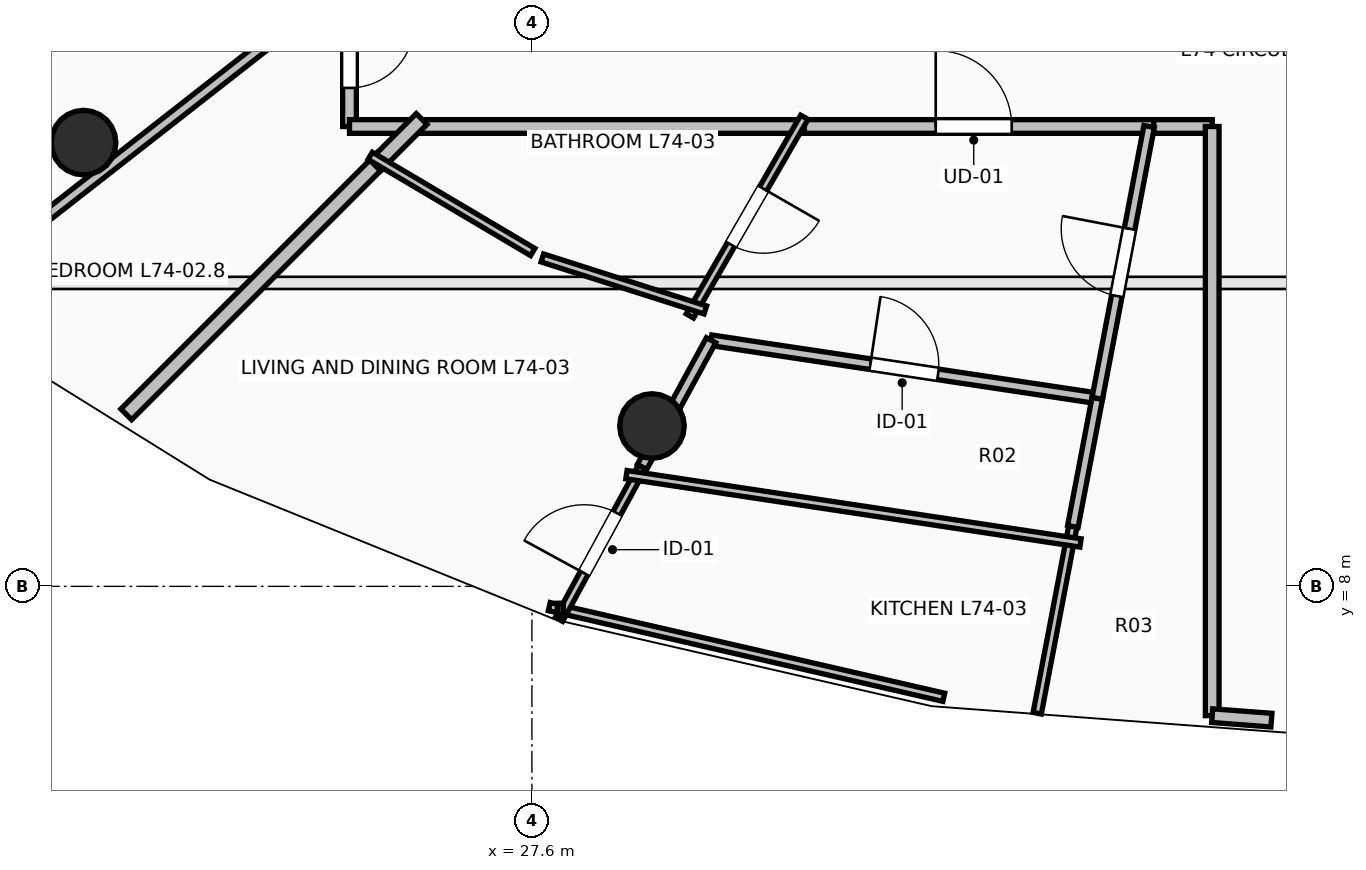
"""IFC4 building model, lengths in metres.
Left out: names, types, materials, properties, quantities, classifications, styles, units other than length and angle.
Written with IfcOpenShell. Run it as: python <this file> out.ifc"""

import sys

from ifc_helpers import new_model, si_unit, direction, frame, frame_2d, origin, origin_2d, place, context, subcontext, project, spatial, rectangle, circle, extrude, element, fill, save


model = new_model("IFC4")
c1 = context("Model", 3, precision=1e-05, world=origin(), true_north=direction((0.0, 1.0)))
c2 = subcontext(c1, "Body", "Model", "MODEL_VIEW")
j1 = project(units=[si_unit("LENGTHUNIT", "METRE"), si_unit("PLANEANGLEUNIT", "RADIAN")], contexts=[c1])
p1 = place(None, origin())
s1 = spatial("IfcSite", under=j1, at=p1, CompositionType="ELEMENT")
p2 = place(p1, origin())
s2 = spatial("IfcBuilding", under=s1, at=p2, CompositionType="ELEMENT")
p3 = place(p2, frame((0.0, 0.0, 273.3)))
s3 = spatial("IfcBuildingStorey", under=s2, at=p3, CompositionType="ELEMENT", Elevation=273.3)
for number, where, z_axis, x_axis in (
    (1, (21.701, 13.838, 0.0), (0.0, 0.0, 1.0), (-0.707, -0.707, 0.0)),
    (2, (29.179, 10.109, 0.0), (0.0, 0.0, 1.0), (-0.383, -0.924, 0.0)),
):
    element("IfcColumn", number, at=place(p3, frame(where, z_axis=z_axis, x_axis=x_axis)), inside=s3, PredefinedType="COLUMN", context=c2, shape_type="SweptSolid", body=[
        extrude(circle(Radius=0.425, at=origin_2d()), origin(), (0.0, 0.0, 1.0), 3.55),
    ])
p4 = place(p3, frame((25.2, 15.915, 0.0), z_axis=(0.0, 0.0, 1.0), x_axis=(0.0, -1.0, 0.0)))
e3 = element("IfcWall", 3, at=p4, inside=s3, PredefinedType="PARTITIONING", context=c2, shape_type="SweptSolid", body=[
    extrude(rectangle(XDim=1.865, YDim=0.18, at=frame_2d((0.933, 0.0))), origin(), (0.0, 0.0, 1.0), 2.482),
])
p5 = place(p4, frame((0.508, 0.0, 0.0)))
e4 = element("IfcOpeningElement", 4, at=p5, cuts=e3, PredefinedType="OPENING", context=c2, shape_type="SweptSolid", body=[
    extrude(rectangle(XDim=0.85, YDim=2.1, at=frame_2d((0.425, 1.05))), frame((0.0, 0.105, 0.0), z_axis=(0.0, -1.0, 0.0), x_axis=(1.0, 0.0, 0.0)), (0.0, 0.0, 1.0), 0.21),
])
p6 = place(p3, frame((25.2, 14.05, 0.0), z_axis=(0.0, 0.0, 1.0), x_axis=(1.0, 0.0, 0.0)))
e5 = element("IfcWall", 5, at=p6, inside=s3, PredefinedType="PARTITIONING", context=c2, shape_type="SweptSolid", body=[
    extrude(rectangle(XDim=0.91, YDim=0.18, at=frame_2d((0.455, 0.0))), origin(), (0.0, 0.0, 1.0), 2.979),
])
p7 = place(p3, frame((31.045, 14.05, 0.0), z_axis=(0.0, 0.0, 1.0), x_axis=(1.0, 0.0, 0.0)))
e6 = element("IfcWall", 6, at=p7, inside=s3, PredefinedType="PARTITIONING", context=c2, shape_type="SweptSolid", body=[
    extrude(rectangle(XDim=4.735, YDim=0.18, at=frame_2d((2.368, 0.0))), origin(), (0.0, 0.0, 1.0), 3.29),
])
p8 = place(p7, frame((1.867, 0.0, 0.0)))
e7 = element("IfcOpeningElement", 7, at=p8, cuts=e6, PredefinedType="OPENING", context=c2, shape_type="SweptSolid", body=[
    extrude(rectangle(XDim=1.0, YDim=2.15, at=frame_2d((0.5, 1.075))), frame((0.0, 0.105, 0.0), z_axis=(0.0, -1.0, 0.0), x_axis=(1.0, 0.0, 0.0)), (0.0, 0.0, 1.0), 0.21),
])
p9 = place(p3, frame((25.97, 14.05, 0.0), z_axis=(0.0, 0.0, 1.0), x_axis=(1.0, 0.0, 0.0)))
e8 = element("IfcWall", 8, at=p9, inside=s3, PredefinedType="PARTITIONING", context=c2, shape_type="SweptSolid", body=[
    extrude(rectangle(XDim=5.215, YDim=0.18, at=frame_2d((2.607, 0.0))), origin(), (0.0, 0.0, 1.0), 2.482),
])
p10 = place(p3, frame((35.78, 14.05, 0.0), z_axis=(0.0, 0.0, 1.0), x_axis=(1.0, 0.0, 0.0)))
e9 = element("IfcWall", 9, at=p10, inside=s3, PredefinedType="PARTITIONING", context=c2, shape_type="SweptSolid", body=[
    extrude(rectangle(XDim=0.77, YDim=0.18, at=frame_2d((0.385, 0.0))), origin(), (0.0, 0.0, 1.0), 2.924),
])
p11 = place(p3, frame((36.55, 14.05, 0.0), z_axis=(0.0, 0.0, 1.0), x_axis=(0.0, -1.0, 0.0)))
e10 = element("IfcWall", 10, at=p11, inside=s3, PredefinedType="PARTITIONING", context=c2, shape_type="SweptSolid", body=[
    extrude(rectangle(XDim=7.751, YDim=0.18, at=frame_2d((3.875, 0.0))), origin(), (0.0, 0.0, 1.0), 2.874),
])
p12 = place(p3, frame((36.55, 6.299, 0.0), z_axis=(0.0, 0.0, 1.0), x_axis=(0.997136622012, -0.0756211415, 0.0)))
e11 = element("IfcWall", 11, at=p12, inside=s3, PredefinedType="PARTITIONING", context=c2, shape_type="SweptSolid", body=[
    extrude(rectangle(XDim=0.781, YDim=0.18, at=frame_2d((0.391, 0.0))), origin(), (0.0, 0.0, 1.0), 3.29),
])
p13 = place(p3, frame((17.602, 13.72, 0.0), z_axis=(0.0, 0.0, 1.0), x_axis=(0.856734134601, 0.515758298633, 0.0)))
e12 = element("IfcWall", 12, at=p13, inside=s3, PredefinedType="PARTITIONING", context=c2, shape_type="SweptSolid", body=[
    extrude(rectangle(XDim=8.868, YDim=0.14, at=frame_2d((4.434, 0.0))), origin(), (0.0, 0.0, 1.0), 2.482),
])
p14 = place(p3, frame((19.819, 11.782, 0.0), z_axis=(0.0, 0.0, 1.0), x_axis=(0.78765580417, 0.61611552014, 0.0)))
e13 = element("IfcWall", 13, at=p14, inside=s3, PredefinedType="PARTITIONING", context=c2, shape_type="SweptSolid", body=[
    extrude(rectangle(XDim=6.832, YDim=0.14, at=frame_2d((3.416, 0.0))), origin(), (0.0, 0.0, 1.0), 2.482),
])
p15 = place(p3, frame((22.263, 10.263, 0.0), z_axis=(0.0, 0.0, 1.0), x_axis=(0.707106781187, 0.707106781187, 0.0)))
e14 = element("IfcWall", 14, at=p15, inside=s3, PredefinedType="PARTITIONING", context=c2, shape_type="SweptSolid", body=[
    extrude(rectangle(XDim=4.771, YDim=0.2, at=frame_2d((2.386, 0.0))), origin(), (0.0, 0.0, 1.0), 2.874),
])
p16 = place(p3, frame((25.538, 13.538, 0.0), z_axis=(0.0, 0.0, 1.0), x_axis=(0.707106781187, 0.707106781187, 0.0)))
e15 = element("IfcWall", 15, at=p16, inside=s3, PredefinedType="PARTITIONING", context=c2, shape_type="SweptSolid", body=[
    extrude(rectangle(XDim=0.864, YDim=0.2, at=frame_2d((0.432, 0.0))), origin(), (0.0, 0.0, 1.0), 2.979),
])
p17 = place(p3, frame((31.184, 14.171, 0.0), z_axis=(0.0, 0.0, 1.0), x_axis=(-0.499203880251, -0.86648455609, 0.0)))
e16 = element("IfcWall", 16, at=p17, inside=s3, PredefinedType="PARTITIONING", context=c2, shape_type="SweptSolid", body=[
    extrude(rectangle(XDim=3.017, YDim=0.11, at=frame_2d((1.508, 0.0))), origin(), (0.0, 0.0, 1.0), 2.924),
])
p18 = place(p17, frame((1.083, 0.0, 0.0)))
e17 = element("IfcOpeningElement", 17, at=p18, cuts=e16, PredefinedType="OPENING", context=c2, shape_type="SweptSolid", body=[
    extrude(rectangle(XDim=0.85, YDim=2.1, at=frame_2d((0.425, 1.05))), frame((0.0, 0.07, 0.0), z_axis=(0.0, -1.0, 0.0), x_axis=(1.0, 0.0, 0.0)), (0.0, 0.0, 1.0), 0.14),
])
p19 = place(p3, frame((29.881, 11.636, 0.0), z_axis=(0.0, 0.0, 1.0), x_axis=(-0.952713330874, 0.30387054674, 0.0)))
e18 = element("IfcWall", 18, at=p19, inside=s3, PredefinedType="PARTITIONING", context=c2, shape_type="SweptSolid", body=[
    extrude(rectangle(XDim=2.251, YDim=0.11, at=frame_2d((1.125, 0.0))), origin(), (0.0, 0.0, 1.0), 2.482),
])
p20 = place(p3, frame((27.611, 12.399, 0.0), z_axis=(0.0, 0.0, 1.0), x_axis=(-0.860546797705, 0.509371386082, 0.0)))
e19 = element("IfcWall", 19, at=p20, inside=s3, PredefinedType="PARTITIONING", context=c2, shape_type="SweptSolid", body=[
    extrude(rectangle(XDim=2.485, YDim=0.11, at=frame_2d((1.242, 0.0))), origin(), (0.0, 0.0, 1.0), 3.29),
])
p21 = place(p3, frame((34.716, 8.789, 0.0), z_axis=(0.0, 0.0, 1.0), x_axis=(-0.187233159216, -0.982315501298, 0.0)))
e20 = element("IfcWall", 20, at=p21, inside=s3, PredefinedType="PARTITIONING", context=c2, shape_type="SweptSolid", body=[
    extrude(rectangle(XDim=2.502, YDim=0.11, at=frame_2d((1.251, 0.0))), origin(), (0.0, 0.0, 1.0), 3.29),
])
p22 = place(p3, frame((27.829, 7.733, 0.0), z_axis=(0.0, 0.0, 1.0), x_axis=(0.974586324437, -0.224012268015, 0.0)))
e21 = element("IfcWall", 21, at=p22, inside=s3, PredefinedType="PARTITIONING", context=c2, shape_type="SweptSolid", body=[
    extrude(rectangle(XDim=5.325, YDim=0.11, at=frame_2d((2.663, 0.0))), origin(), (0.0, 0.0, 1.0), 3.29),
])
p23 = place(p3, frame((27.956, 7.566, 0.0), z_axis=(0.0, 0.0, 1.0), x_axis=(0.478485169604, 0.878095634011, 0.0)))
e22 = element("IfcWall", 22, at=p23, inside=s3, PredefinedType="PARTITIONING", context=c2, shape_type="SweptSolid", body=[
    extrude(rectangle(XDim=2.284, YDim=0.11, at=frame_2d((1.142, 0.0))), origin(), (0.0, 0.0, 1.0), 3.29),
])
p24 = place(p23, frame((0.692, 0.0, 0.0)))
e23 = element("IfcOpeningElement", 23, at=p24, cuts=e22, PredefinedType="OPENING", context=c2, shape_type="SweptSolid", body=[
    extrude(rectangle(XDim=0.9, YDim=2.1, at=frame_2d((0.45, 1.05))), frame((0.0, 0.07, 0.0), z_axis=(0.0, -1.0, 0.0), x_axis=(1.0, 0.0, 0.0)), (0.0, 0.0, 1.0), 0.14),
])
p25 = place(p3, frame((29.957, 11.238, 0.0), z_axis=(0.0, 0.0, 1.0), x_axis=(0.988886109078, -0.148675025721, 0.0)))
e24 = element("IfcWall", 24, at=p25, inside=s3, PredefinedType="PARTITIONING", context=c2, shape_type="SweptSolid", body=[
    extrude(rectangle(XDim=5.138, YDim=0.14, at=frame_2d((2.569, 0.0))), origin(), (0.0, 0.0, 1.0), 3.29),
])
p26 = place(p25, frame((2.119, 0.0, 0.0)))
e25 = element("IfcOpeningElement", 25, at=p26, cuts=e24, PredefinedType="OPENING", context=c2, shape_type="SweptSolid", body=[
    extrude(rectangle(XDim=0.9, YDim=2.1, at=frame_2d((0.45, 1.05))), frame((0.0, 0.085, 0.0), z_axis=(0.0, -1.0, 0.0), x_axis=(1.0, 0.0, 0.0)), (0.0, 0.0, 1.0), 0.17),
])
p27 = place(p3, frame((35.038, 10.474, 0.0), z_axis=(0.0, 0.0, 1.0), x_axis=(-0.187353972187, -0.982292466176, 0.0)))
e26 = element("IfcWall", 26, at=p27, inside=s3, PredefinedType="PARTITIONING", context=c2, shape_type="SweptSolid", body=[
    extrude(rectangle(XDim=1.716, YDim=0.14, at=frame_2d((0.858, 0.0))), origin(), (0.0, 0.0, 1.0), 2.874),
])
p28 = place(p3, frame((29.049, 9.572, 0.0), z_axis=(0.0, 0.0, 1.0), x_axis=(0.478536562944, 0.878067627194, 0.0)))
e27 = element("IfcWall", 27, at=p28, inside=s3, PredefinedType="PARTITIONING", context=c2, shape_type="SweptSolid", body=[
    extrude(rectangle(XDim=1.897, YDim=0.14, at=frame_2d((0.949, 0.0))), origin(), (0.0, 0.0, 1.0), 3.29),
])
p29 = place(p3, frame((35.038, 10.474, 0.0), z_axis=(0.0, 0.0, 1.0), x_axis=(0.187312418361, 0.982300390882, 0.0)))
e28 = element("IfcWall", 28, at=p29, inside=s3, PredefinedType="PARTITIONING", context=c2, shape_type="SweptSolid", body=[
    extrude(rectangle(XDim=3.64, YDim=0.14, at=frame_2d((1.82, 0.0))), origin(), (0.0, 0.0, 1.0), 2.979),
])
p30 = place(p29, frame((1.37, 0.0, 0.0)))
e29 = element("IfcOpeningElement", 29, at=p30, cuts=e28, PredefinedType="OPENING", context=c2, shape_type="SweptSolid", body=[
    extrude(rectangle(XDim=0.9, YDim=2.1, at=frame_2d((0.45, 1.05))), frame((0.0, 0.085, 0.0), z_axis=(0.0, -1.0, 0.0), x_axis=(1.0, 0.0, 0.0)), (0.0, 0.0, 1.0), 0.17),
])
p31 = place(p3, frame((34.817, 8.571, 0.0), z_axis=(0.0, 0.0, 1.0), x_axis=(-0.988879067965, 0.148721850918, 0.0)))
e30 = element("IfcWall", 30, at=p31, inside=s3, PredefinedType="PARTITIONING", context=c2, shape_type="SweptSolid", body=[
    extrude(rectangle(XDim=6.041, YDim=0.11, at=frame_2d((3.021, 0.0))), origin(), (0.0, 0.0, 1.0), 3.29),
])
p32 = place(p8, origin())
e31 = element("IfcDoor", 31, at=p32, inside=s3, OperationType="SINGLE_SWING_LEFT", PredefinedType="DOOR", context=c2, shape_type="SweptSolid", body=[
    extrude(rectangle(XDim=1.0, YDim=2.15, at=frame_2d((0.5, 1.075))), frame((0.0, 0.025, 0.0), z_axis=(0.0, -1.0, 0.0), x_axis=(1.0, 0.0, 0.0)), (0.0, 0.0, 1.0), 0.05),
])
fill(e7, e31)
p33 = place(p18, origin())
e32 = element("IfcDoor", 32, at=p33, inside=s3, OperationType="SINGLE_SWING_LEFT", PredefinedType="DOOR", context=c2, shape_type="SweptSolid", body=[
    extrude(rectangle(XDim=0.85, YDim=2.1, at=frame_2d((0.425, 1.05))), frame((0.0, 0.025, 0.0), z_axis=(0.0, -1.0, 0.0), x_axis=(1.0, 0.0, 0.0)), (0.0, 0.0, 1.0), 0.05),
])
fill(e17, e32)
p34 = place(p24, origin())
e33 = element("IfcDoor", 33, at=p34, inside=s3, OperationType="SINGLE_SWING_LEFT", PredefinedType="DOOR", context=c2, shape_type="SweptSolid", body=[
    extrude(rectangle(XDim=0.9, YDim=2.1, at=frame_2d((0.45, 1.05))), frame((0.0, 0.025, 0.0), z_axis=(0.0, -1.0, 0.0), x_axis=(1.0, 0.0, 0.0)), (0.0, 0.0, 1.0), 0.05),
])
fill(e23, e33)
p35 = place(p26, origin())
e34 = element("IfcDoor", 34, at=p35, inside=s3, OperationType="SINGLE_SWING_LEFT", PredefinedType="DOOR", context=c2, shape_type="SweptSolid", body=[
    extrude(rectangle(XDim=0.9, YDim=2.1, at=frame_2d((0.45, 1.05))), frame((0.0, 0.025, 0.0), z_axis=(0.0, -1.0, 0.0), x_axis=(1.0, 0.0, 0.0)), (0.0, 0.0, 1.0), 0.05),
])
fill(e25, e34)
p36 = place(p30, origin())
e35 = element("IfcDoor", 35, at=p36, inside=s3, OperationType="SINGLE_SWING_RIGHT", PredefinedType="DOOR", context=c2, shape_type="SweptSolid", body=[
    extrude(rectangle(XDim=0.9, YDim=2.1, at=frame_2d((0.45, 1.05))), frame((0.0, 0.025, 0.0), z_axis=(0.0, -1.0, 0.0), x_axis=(1.0, 0.0, 0.0)), (0.0, 0.0, 1.0), 0.05),
])
fill(e29, e35)
p37 = place(p5, origin())
e36 = element("IfcDoor", 36, at=p37, inside=s3, OperationType="SINGLE_SWING_LEFT", PredefinedType="DOOR", context=c2, shape_type="SweptSolid", body=[
    extrude(rectangle(XDim=0.85, YDim=2.1, at=frame_2d((0.425, 1.05))), frame((0.0, 0.025, 0.0), z_axis=(0.0, -1.0, 0.0), x_axis=(1.0, 0.0, 0.0)), (0.0, 0.0, 1.0), 0.05),
])
fill(e4, e36)
save(model, sys.argv[1])
